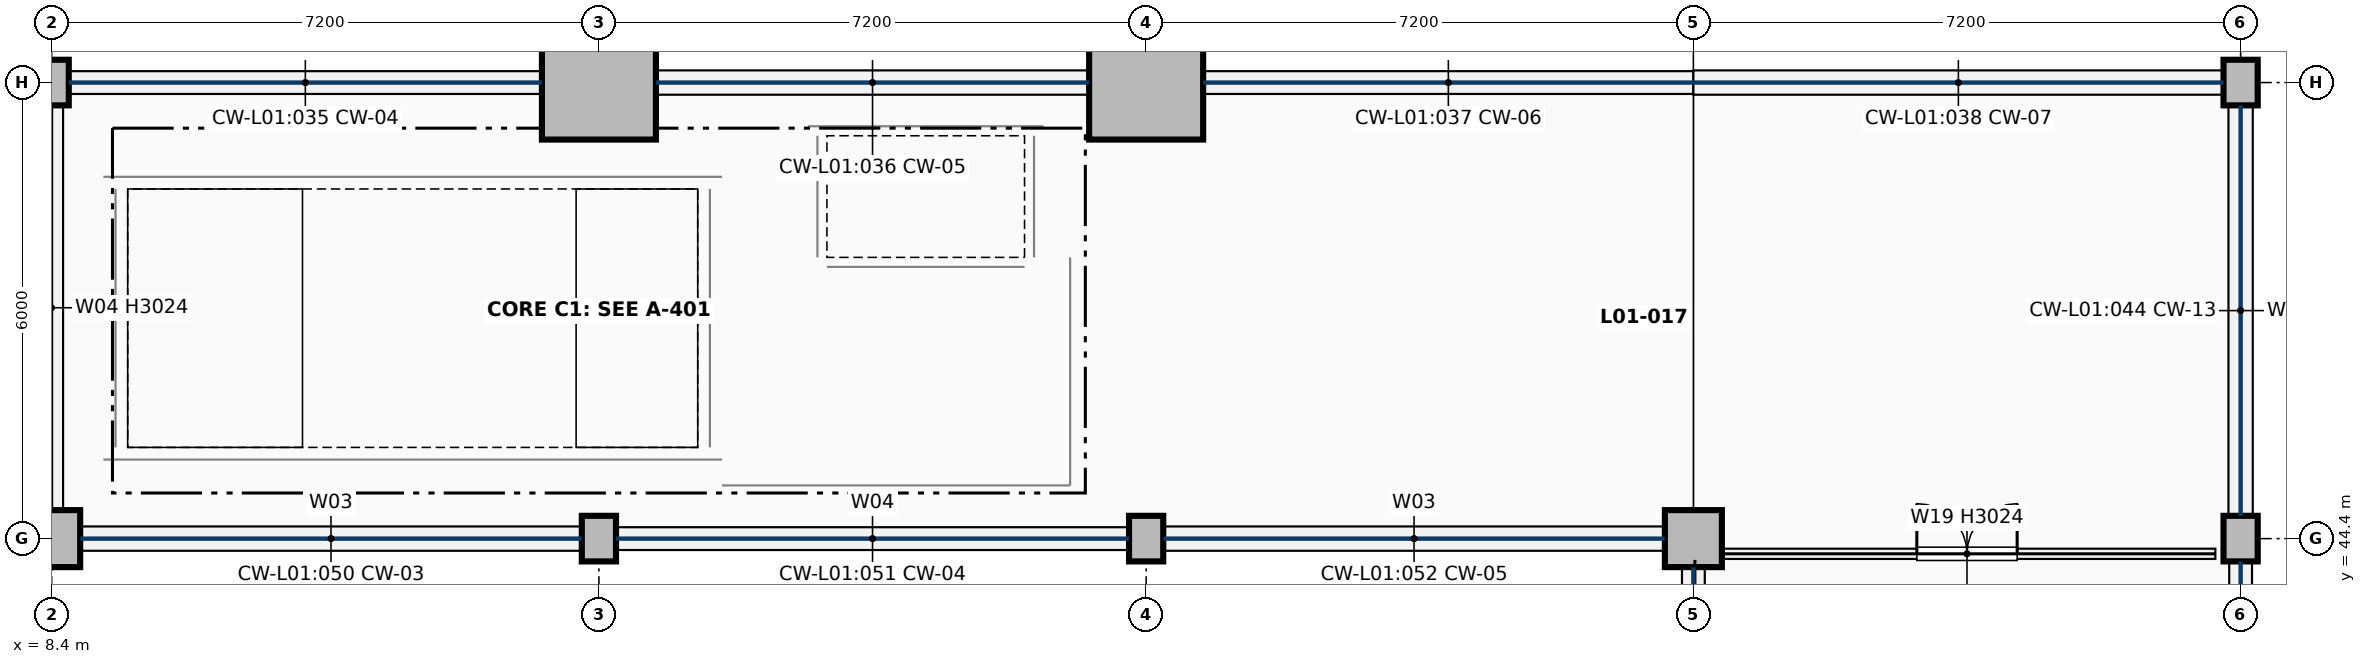
"""IFC4 building model, lengths in metres.
Left out: names, types, materials, properties, quantities, classifications, styles, units other than length and angle.
Written with IfcOpenShell. Run it as: python <this file> out.ifc"""

import sys

from ifc_helpers import new_model, si_unit, direction, frame, frame_2d, origin, origin_2d, place, context, subcontext, project, spatial, rectangle, extrude, element, fill, save


model = new_model("IFC4")
c1 = context("Model", 3, precision=1e-05, world=origin(), true_north=direction((0.0, 1.0)))
c2 = subcontext(c1, "Body", "Model", "MODEL_VIEW")
j1 = project(units=[si_unit("LENGTHUNIT", "METRE"), si_unit("PLANEANGLEUNIT", "RADIAN")], contexts=[c1])
p1 = place(None, origin())
s1 = spatial("IfcSite", under=j1, at=p1, CompositionType="ELEMENT")
p2 = place(p1, origin())
s2 = spatial("IfcBuilding", under=s1, at=p2, CompositionType="ELEMENT")
p3 = place(p2, frame((0.0, 0.0, 5.1)))
s3 = spatial("IfcBuildingStorey", under=s2, at=p3, CompositionType="ELEMENT", Elevation=5.1)
p4 = place(p3, frame((8.4, 44.4, 0.0), z_axis=(0.0, 0.0, 1.0), x_axis=(1.0, 0.0, 0.0)))
e1 = element("IfcColumn", 1, at=p4, inside=s3, PredefinedType="COLUMN", context=c2, shape_type="SweptSolid", body=[
    extrude(rectangle(XDim=0.75, YDim=0.75, at=origin_2d()), origin(), (0.0, 0.0, 1.0), 4.42),
])
for number, where, z_axis, x_axis in (
    (2, (8.4, 50.4, 0.0), (0.0, 0.0, 1.0), (1.0, 0.0, 0.0)),
    (3, (15.6, 44.4, 0.0), (0.0, 0.0, 1.0), (1.0, 0.0, 0.0)),
):
    element("IfcColumn", number, at=place(p3, frame(where, z_axis=z_axis, x_axis=x_axis)), inside=s3, PredefinedType="COLUMN", context=c2, shape_type="SweptSolid", body=[
        extrude(rectangle(XDim=0.45, YDim=0.6, at=origin_2d()), origin(), (0.0, 0.0, 1.0), 4.42),
    ])
p5 = place(p3, frame((15.6, 50.4, 0.0), z_axis=(0.0, 0.0, 1.0), x_axis=(1.0, 0.0, 0.0)))
e4 = element("IfcColumn", 4, at=p5, inside=s3, PredefinedType="COLUMN", context=c2, shape_type="SweptSolid", body=[
    extrude(rectangle(XDim=1.5, YDim=1.5, at=origin_2d()), origin(), (0.0, 0.0, 1.0), 4.42),
])
p6 = place(p3, frame((22.8, 44.4, 0.0), z_axis=(0.0, 0.0, 1.0), x_axis=(1.0, 0.0, 0.0)))
e5 = element("IfcColumn", 5, at=p6, inside=s3, PredefinedType="COLUMN", context=c2, shape_type="SweptSolid", body=[
    extrude(rectangle(XDim=0.45, YDim=0.6, at=origin_2d()), origin(), (0.0, 0.0, 1.0), 4.42),
])
p7 = place(p3, frame((22.8, 50.4, 0.0), z_axis=(0.0, 0.0, 1.0), x_axis=(1.0, 0.0, 0.0)))
e6 = element("IfcColumn", 6, at=p7, inside=s3, PredefinedType="COLUMN", context=c2, shape_type="SweptSolid", body=[
    extrude(rectangle(XDim=1.5, YDim=1.5, at=origin_2d()), origin(), (0.0, 0.0, 1.0), 4.42),
])
p8 = place(p3, frame((30.0, 44.4, 0.0), z_axis=(0.0, 0.0, 1.0), x_axis=(1.0, 0.0, 0.0)))
e7 = element("IfcColumn", 7, at=p8, inside=s3, PredefinedType="COLUMN", context=c2, shape_type="SweptSolid", body=[
    extrude(rectangle(XDim=0.75, YDim=0.75, at=origin_2d()), origin(), (0.0, 0.0, 1.0), 4.42),
])
for number, where, z_axis, x_axis in (
    (8, (37.2, 44.4, 0.0), (0.0, 0.0, 1.0), (1.0, 0.0, 0.0)),
    (9, (37.2, 50.4, 0.0), (0.0, 0.0, 1.0), (1.0, 0.0, 0.0)),
):
    element("IfcColumn", number, at=place(p3, frame(where, z_axis=z_axis, x_axis=x_axis)), inside=s3, PredefinedType="COLUMN", context=c2, shape_type="SweptSolid", body=[
        extrude(rectangle(XDim=0.45, YDim=0.6, at=origin_2d()), origin(), (0.0, 0.0, 1.0), 4.42),
    ])
p9 = place(p3, frame((8.4, 44.777, 0.0), z_axis=(0.0, 0.0, 1.0), x_axis=(0.0, 1.0, 0.0)))
e10 = element("IfcWall", 10, at=p9, inside=s3, PredefinedType="SOLIDWALL", context=c2, shape_type="SweptSolid", body=[
    extrude(rectangle(XDim=5.321, YDim=0.3, at=frame_2d((2.66, 0.0))), origin(), (0.0, 0.0, 1.0), 3.024),
])
p10 = place(p3, frame((8.627, 50.4, 0.0), z_axis=(0.0, 0.0, 1.0), x_axis=(1.0, 0.0, 0.0)))
e11 = element("IfcWall", 11, at=p10, inside=s3, PredefinedType="SOLIDWALL", context=c2, shape_type="SweptSolid", body=[
    extrude(rectangle(XDim=6.221, YDim=0.3, at=frame_2d((3.11, 0.0))), origin(), (0.0, 0.0, 1.0), 0.85),
])
p11 = place(p3, frame((16.352, 50.4, 0.0), z_axis=(0.0, 0.0, 1.0), x_axis=(1.0, 0.0, 0.0)))
e12 = element("IfcWall", 12, at=p11, inside=s3, PredefinedType="SOLIDWALL", context=c2, shape_type="SweptSolid", body=[
    extrude(rectangle(XDim=5.696, YDim=0.32, at=frame_2d((2.848, 0.0))), origin(), (0.0, 0.0, 1.0), 0.85),
])
p12 = place(p3, frame((23.552, 50.4, 0.0), z_axis=(0.0, 0.0, 1.0), x_axis=(1.0, 0.0, 0.0)))
e13 = element("IfcWall", 13, at=p12, inside=s3, PredefinedType="SOLIDWALL", context=c2, shape_type="SweptSolid", body=[
    extrude(rectangle(XDim=6.448, YDim=0.3, at=frame_2d((3.224, 0.0))), origin(), (0.0, 0.0, 1.0), 0.85),
])
p13 = place(p3, frame((30.0, 50.4, 0.0), z_axis=(0.0, 0.0, 1.0), x_axis=(1.0, 0.0, 0.0)))
e14 = element("IfcWall", 14, at=p13, inside=s3, PredefinedType="SOLIDWALL", context=c2, shape_type="SweptSolid", body=[
    extrude(rectangle(XDim=6.973, YDim=0.32, at=frame_2d((3.486, 0.0))), origin(), (0.0, 0.0, 1.0), 0.85),
])
p14 = place(p3, frame((37.2, 37.502, 0.0), z_axis=(0.0, 0.0, 1.0), x_axis=(0.0, 1.0, 0.0)))
e15 = element("IfcWall", 15, at=p14, inside=s3, PredefinedType="SOLIDWALL", context=c2, shape_type="SweptSolid", body=[
    extrude(rectangle(XDim=6.596, YDim=0.3, at=frame_2d((3.298, 0.0))), origin(), (0.0, 0.0, 1.0), 0.85),
])
p15 = place(p3, frame((37.2, 44.702, 0.0), z_axis=(0.0, 0.0, 1.0), x_axis=(0.0, 1.0, 0.0)))
e16 = element("IfcWall", 16, at=p15, inside=s3, PredefinedType="SOLIDWALL", context=c2, shape_type="SweptSolid", body=[
    extrude(rectangle(XDim=5.396, YDim=0.32, at=frame_2d((2.698, 0.0))), origin(), (0.0, 0.0, 1.0), 0.85),
])
p16 = place(p3, frame((30.0, 37.577, 0.0), z_axis=(0.0, 0.0, 1.0), x_axis=(0.0, 1.0, 0.0)))
e17 = element("IfcWall", 17, at=p16, inside=s3, PredefinedType="SOLIDWALL", context=c2, shape_type="SweptSolid", body=[
    extrude(rectangle(XDim=6.446, YDim=0.3, at=frame_2d((3.223, 0.0))), origin(), (0.0, 0.0, 1.0), 0.85),
])
p17 = place(p3, frame((8.777, 44.4, 0.0), z_axis=(0.0, 0.0, 1.0), x_axis=(1.0, 0.0, 0.0)))
e18 = element("IfcWall", 18, at=p17, inside=s3, PredefinedType="SOLIDWALL", context=c2, shape_type="SweptSolid", body=[
    extrude(rectangle(XDim=6.596, YDim=0.32, at=frame_2d((3.298, 0.0))), origin(), (0.0, 0.0, 1.0), 0.85),
])
p18 = place(p3, frame((15.827, 44.4, 0.0), z_axis=(0.0, 0.0, 1.0), x_axis=(1.0, 0.0, 0.0)))
e19 = element("IfcWall", 19, at=p18, inside=s3, PredefinedType="SOLIDWALL", context=c2, shape_type="SweptSolid", body=[
    extrude(rectangle(XDim=6.746, YDim=0.3, at=frame_2d((3.373, 0.0))), origin(), (0.0, 0.0, 1.0), 0.85),
])
p19 = place(p3, frame((23.027, 44.4, 0.0), z_axis=(0.0, 0.0, 1.0), x_axis=(1.0, 0.0, 0.0)))
e20 = element("IfcWall", 20, at=p19, inside=s3, PredefinedType="SOLIDWALL", context=c2, shape_type="SweptSolid", body=[
    extrude(rectangle(XDim=6.596, YDim=0.32, at=frame_2d((3.298, 0.0))), origin(), (0.0, 0.0, 1.0), 0.85),
])
p20 = place(p3, frame((9.24, 45.6, 0.0), z_axis=(0.0, 0.0, 1.0), x_axis=(0.0, 1.0, 0.0)))
e21 = element("IfcWall", 21, at=p20, inside=s3, PredefinedType="SHEAR", context=c2, shape_type="SweptSolid", body=[
    extrude(rectangle(XDim=3.4, YDim=0.32, at=frame_2d((1.7, 0.0))), origin(), (0.0, 0.0, 1.0), 4.42),
])
for number, where, z_axis, x_axis in (
    (22, (9.08, 45.44, 0.0), (0.0, 0.0, 1.0), (1.0, 0.0, 0.0)),
    (23, (9.08, 49.16, 0.0), (0.0, 0.0, 1.0), (1.0, 0.0, 0.0)),
):
    element("IfcWall", number, at=place(p3, frame(where, z_axis=z_axis, x_axis=x_axis)), inside=s3, PredefinedType="SHEAR", context=c2, shape_type="SweptSolid", body=[
        extrude(rectangle(XDim=8.14, YDim=0.32, at=frame_2d((4.07, 0.0))), origin(), (0.0, 0.0, 1.0), 4.42),
    ])
p21 = place(p3, frame((17.06, 45.6, 0.0), z_axis=(0.0, 0.0, 1.0), x_axis=(0.0, 1.0, 0.0)))
e24 = element("IfcWall", 24, at=p21, inside=s3, PredefinedType="SHEAR", context=c2, shape_type="SweptSolid", body=[
    extrude(rectangle(XDim=3.4, YDim=0.32, at=frame_2d((1.7, 0.0))), origin(), (0.0, 0.0, 1.0), 4.42),
])
p22 = place(p21, frame((0.65, 0.0, 0.0)))
e25 = element("IfcOpeningElement", 25, at=p22, cuts=e24, PredefinedType="OPENING", context=c2, shape_type="SweptSolid", body=[
    extrude(rectangle(XDim=1.2, YDim=2.2, at=frame_2d((0.6, 1.1))), frame((0.0, 0.17, 0.0), z_axis=(0.0, -1.0, 0.0), x_axis=(1.0, 0.0, 0.0)), (0.0, 0.0, 1.0), 0.34),
])
for number, where, z_axis, x_axis in (
    (26, (18.475, 48.1, 0.0), (0.0, 0.0, 1.0), (0.0, 1.0, 0.0)),
    (27, (21.325, 48.1, 0.0), (0.0, 0.0, 1.0), (0.0, 1.0, 0.0)),
):
    element("IfcWall", number, at=place(p3, frame(where, z_axis=z_axis, x_axis=x_axis)), inside=s3, PredefinedType="SHEAR", context=c2, shape_type="SweptSolid", body=[
        extrude(rectangle(XDim=1.6, YDim=0.25, at=frame_2d((0.8, 0.0))), origin(), (0.0, 0.0, 1.0), 4.42),
    ])
p23 = place(p3, frame((18.35, 49.825, 0.0), z_axis=(0.0, 0.0, 1.0), x_axis=(1.0, 0.0, 0.0)))
e28 = element("IfcWall", 28, at=p23, inside=s3, PredefinedType="SHEAR", context=c2, shape_type="SweptSolid", body=[
    extrude(rectangle(XDim=3.1, YDim=0.25, at=frame_2d((1.55, 0.0))), origin(), (0.0, 0.0, 1.0), 4.42),
])
p24 = place(p3, frame((18.6, 47.975, 0.0), z_axis=(0.0, 0.0, 1.0), x_axis=(1.0, 0.0, 0.0)))
e29 = element("IfcWall", 29, at=p24, inside=s3, PredefinedType="SHEAR", context=c2, shape_type="SweptSolid", body=[
    extrude(rectangle(XDim=2.6, YDim=0.25, at=frame_2d((1.3, 0.0))), origin(), (0.0, 0.0, 1.0), 4.42),
])
p25 = place(p24, frame((0.75, 0.0, 0.0)))
e30 = element("IfcOpeningElement", 30, at=p25, cuts=e29, PredefinedType="OPENING", context=c2, shape_type="SweptSolid", body=[
    extrude(rectangle(XDim=1.1, YDim=2.15, at=frame_2d((0.55, 1.075))), frame((0.0, 0.135, 0.0), z_axis=(0.0, -1.0, 0.0), x_axis=(1.0, 0.0, 0.0)), (0.0, 0.0, 1.0), 0.27),
])
p26 = place(p3, frame((21.8, 45.1, 0.0), z_axis=(0.0, 0.0, 1.0), x_axis=(0.0, 1.0, 0.0)))
e31 = element("IfcWall", 31, at=p26, inside=s3, PredefinedType="PARTITIONING", context=c2, shape_type="SweptSolid", body=[
    extrude(rectangle(XDim=3.0, YDim=0.2, at=frame_2d((1.5, 0.0))), origin(), (0.0, 0.0, 1.0), 3.694),
])
p27 = place(p26, frame((0.775, 0.0, 0.0)))
e32 = element("IfcOpeningElement", 32, at=p27, cuts=e31, PredefinedType="OPENING", context=c2, shape_type="SweptSolid", body=[
    extrude(rectangle(XDim=1.45, YDim=2.2, at=frame_2d((0.725, 1.1))), frame((0.0, 0.11, 0.0), z_axis=(0.0, -1.0, 0.0), x_axis=(1.0, 0.0, 0.0)), (0.0, 0.0, 1.0), 0.22),
])
p28 = place(p3, frame((17.22, 45.1, 0.0), z_axis=(0.0, 0.0, 1.0), x_axis=(1.0, 0.0, 0.0)))
e33 = element("IfcWall", 33, at=p28, inside=s3, PredefinedType="PARTITIONING", context=c2, shape_type="SweptSolid", body=[
    extrude(rectangle(XDim=4.58, YDim=0.2, at=frame_2d((2.29, 0.0))), origin(), (0.0, 0.0, 1.0), 3.694),
])
p29 = place(p3, frame((30.333, 44.2, 0.0), z_axis=(0.0, 0.0, 1.0), x_axis=(1.0, 0.0, 0.0)))
e34 = element("IfcWall", 34, at=p29, inside=s3, PredefinedType="PARTITIONING", context=c2, shape_type="SweptSolid", body=[
    extrude(rectangle(XDim=6.535, YDim=0.135, at=frame_2d((3.268, 0.0))), origin(), (0.0, 0.0, 1.0), 3.024),
])
p30 = place(p29, frame((2.607, 0.0, 0.0)))
e35 = element("IfcOpeningElement", 35, at=p30, cuts=e34, PredefinedType="OPENING", context=c2, shape_type="SweptSolid", body=[
    extrude(rectangle(XDim=1.32, YDim=2.22, at=frame_2d((0.66, 1.11))), frame((0.0, 0.078, 0.0), z_axis=(0.0, -1.0, 0.0), x_axis=(1.0, 0.0, 0.0)), (0.0, 0.0, 1.0), 0.155),
])
p31 = place(p22, origin())
e36 = element("IfcDoor", 36, at=p31, inside=s3, OperationType="SINGLE_SWING_LEFT", PredefinedType="DOOR", context=c2, shape_type="SweptSolid", body=[
    extrude(rectangle(XDim=1.2, YDim=2.2, at=frame_2d((0.6, 1.1))), frame((0.0, 0.025, 0.0), z_axis=(0.0, -1.0, 0.0), x_axis=(1.0, 0.0, 0.0)), (0.0, 0.0, 1.0), 0.05),
])
fill(e25, e36)
p32 = place(p25, origin())
e37 = element("IfcDoor", 37, at=p32, inside=s3, OperationType="DOUBLE_DOOR_SLIDING", PredefinedType="DOOR", context=c2, shape_type="SweptSolid", body=[
    extrude(rectangle(XDim=1.1, YDim=2.15, at=frame_2d((0.55, 1.075))), frame((0.0, 0.025, 0.0), z_axis=(0.0, -1.0, 0.0), x_axis=(1.0, 0.0, 0.0)), (0.0, 0.0, 1.0), 0.05),
])
fill(e30, e37)
p33 = place(p27, frame((1.45, 0.0, 0.0), z_axis=(0.0, 0.0, 1.0), x_axis=(-1.0, 0.0, 0.0)))
e38 = element("IfcDoor", 38, at=p33, inside=s3, OperationType="DOUBLE_DOOR_SINGLE_SWING", PredefinedType="DOOR", context=c2, shape_type="SweptSolid", body=[
    extrude(rectangle(XDim=1.45, YDim=2.2, at=frame_2d((0.725, 1.1))), frame((0.0, 0.025, 0.0), z_axis=(0.0, -1.0, 0.0), x_axis=(1.0, 0.0, 0.0)), (0.0, 0.0, 1.0), 0.05),
])
fill(e32, e38)
p34 = place(p30, origin())
e39 = element("IfcDoor", 39, at=p34, inside=s3, OperationType="DOUBLE_DOOR_SINGLE_SWING", PredefinedType="DOOR", context=c2, shape_type="SweptSolid", body=[
    extrude(rectangle(XDim=1.32, YDim=2.22, at=frame_2d((0.66, 1.11))), frame((0.0, 0.025, 0.0), z_axis=(0.0, -1.0, 0.0), x_axis=(1.0, 0.0, 0.0)), (0.0, 0.0, 1.0), 0.05),
])
fill(e35, e39)
save(model, sys.argv[1])
